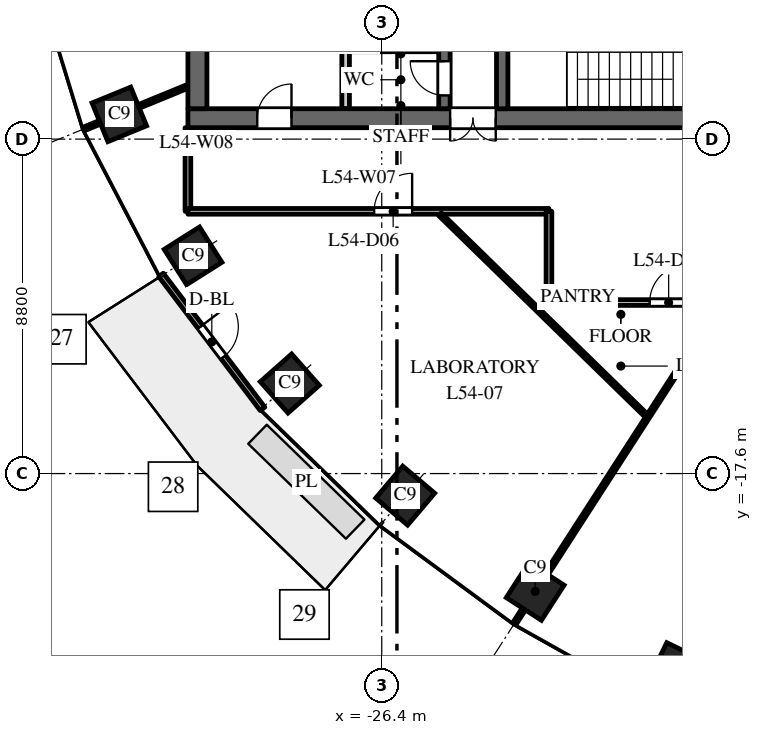
"""IFC4 building model, lengths in metres.
Left out: names, types, materials, properties, quantities, classifications, styles, units other than length and angle.
Written with IfcOpenShell. Run it as: python <this file> out.ifc"""

import sys

from ifc_helpers import new_model, si_unit, direction, frame, frame_2d, origin, origin_2d, place, context, subcontext, project, spatial, rectangle, extrude, element, fill, save


model = new_model("IFC4")
c1 = context("Model", 3, precision=1e-05, world=origin(), true_north=direction((0.0, 1.0)))
c2 = subcontext(c1, "Body", "Model", "MODEL_VIEW")
j1 = project(units=[si_unit("LENGTHUNIT", "METRE"), si_unit("PLANEANGLEUNIT", "RADIAN")], contexts=[c1])
p1 = place(None, origin())
s1 = spatial("IfcSite", under=j1, at=p1, CompositionType="ELEMENT")
p2 = place(p1, origin())
s2 = spatial("IfcBuilding", under=s1, at=p2, CompositionType="ELEMENT")
p3 = place(p2, frame((0.0, 0.0, 257.5)))
s3 = spatial("IfcBuildingStorey", under=s2, at=p3, CompositionType="ELEMENT", Elevation=257.5)
for number, where, z_axis, x_axis in (
    (1, (-33.305, -8.149, 0.0), (0.0, 0.0, 1.0), (0.379, -0.925, 0.0)),
    (2, (-31.365, -11.871, 0.0), (0.0, 0.0, 1.0), (0.535, -0.845, 0.0)),
    (3, (-28.819, -15.23, 0.0), (0.0, 0.0, 1.0), (0.663, -0.749, 0.0)),
    (4, (-25.783, -18.18, 0.0), (0.0, 0.0, 1.0), (0.763, -0.646, 0.0)),
    (5, (-22.362, -20.7, 0.0), (0.0, 0.0, 1.0), (0.84, -0.542, 0.0)),
    (6, (-18.646, -22.785, 0.0), (0.0, 0.0, 1.0), (0.898, -0.439, 0.0)),
):
    element("IfcColumn", number, at=place(p3, frame(where, z_axis=z_axis, x_axis=x_axis)), inside=s3, PredefinedType="COLUMN", context=c2, shape_type="SweptSolid", body=[
        extrude(rectangle(XDim=1.1, YDim=1.1, at=origin_2d()), origin(), (0.0, 0.0, 1.0), 4.0),
    ])
p4 = place(p3, frame((-16.5, -8.25, 0.0), z_axis=(0.0, 0.0, 1.0), x_axis=(-1.0, 0.0, 0.0)))
e7 = element("IfcWall", 7, at=p4, inside=s3, PredefinedType="SHEAR", context=c2, shape_type="SweptSolid", body=[
    extrude(rectangle(XDim=15.0, YDim=0.5, at=frame_2d((7.5, 0.0))), origin(), (0.0, 0.0, 1.0), 3.7),
])
p5 = place(p4, frame((6.9, 0.0, 0.0)))
e8 = element("IfcOpeningElement", 8, at=p5, cuts=e7, PredefinedType="OPENING", context=c2, shape_type="SweptSolid", body=[
    extrude(rectangle(XDim=1.2, YDim=2.1, at=frame_2d((0.6, 1.05))), frame((0.0, 0.26, 0.0), z_axis=(0.0, -1.0, 0.0), x_axis=(1.0, 0.0, 0.0)), (0.0, 0.0, 1.0), 0.52),
])
p6 = place(p4, frame((12.275, 0.0, 0.0)))
e9 = element("IfcOpeningElement", 9, at=p6, cuts=e7, PredefinedType="OPENING", context=c2, shape_type="SweptSolid", body=[
    extrude(rectangle(XDim=0.9, YDim=2.1, at=frame_2d((0.45, 1.05))), frame((0.0, 0.26, 0.0), z_axis=(0.0, -1.0, 0.0), x_axis=(1.0, 0.0, 0.0)), (0.0, 0.0, 1.0), 0.52),
])
p7 = place(p3, frame((-24.75, -8.0, 0.0), z_axis=(0.0, 0.0, 1.0), x_axis=(0.0, 1.0, 0.0)))
e10 = element("IfcWall", 10, at=p7, inside=s3, PredefinedType="SHEAR", context=c2, shape_type="SweptSolid", body=[
    extrude(rectangle(XDim=16.0, YDim=0.3, at=frame_2d((8.0, 0.0))), origin(), (0.0, 0.0, 1.0), 3.7),
])
p8 = place(p7, frame((4.425, 0.0, 0.0)))
e11 = element("IfcOpeningElement", 11, at=p8, cuts=e10, PredefinedType="OPENING", context=c2, shape_type="SweptSolid", body=[
    extrude(rectangle(XDim=1.1, YDim=2.1, at=frame_2d((0.55, 1.05))), frame((0.0, 0.16, 0.0), z_axis=(0.0, -1.0, 0.0), x_axis=(1.0, 0.0, 0.0)), (0.0, 0.0, 1.0), 0.32),
])
p9 = place(p7, frame((7.45, 0.0, 0.0)))
e12 = element("IfcOpeningElement", 12, at=p9, cuts=e10, PredefinedType="OPENING", context=c2, shape_type="SweptSolid", body=[
    extrude(rectangle(XDim=1.1, YDim=2.1, at=frame_2d((0.55, 1.05))), frame((0.0, 0.16, 0.0), z_axis=(0.0, -1.0, 0.0), x_axis=(1.0, 0.0, 0.0)), (0.0, 0.0, 1.0), 0.32),
])
p10 = place(p7, frame((10.475, 0.0, 0.0)))
e13 = element("IfcOpeningElement", 13, at=p10, cuts=e10, PredefinedType="OPENING", context=c2, shape_type="SweptSolid", body=[
    extrude(rectangle(XDim=1.1, YDim=2.1, at=frame_2d((0.55, 1.05))), frame((0.0, 0.16, 0.0), z_axis=(0.0, -1.0, 0.0), x_axis=(1.0, 0.0, 0.0)), (0.0, 0.0, 1.0), 0.32),
])
p11 = place(p7, frame((13.75, 0.0, 0.0)))
e14 = element("IfcOpeningElement", 14, at=p11, cuts=e10, PredefinedType="OPENING", context=c2, shape_type="SweptSolid", body=[
    extrude(rectangle(XDim=0.9, YDim=2.1, at=frame_2d((0.45, 1.05))), frame((0.0, 0.16, 0.0), z_axis=(0.0, -1.0, 0.0), x_axis=(1.0, 0.0, 0.0)), (0.0, 0.0, 1.0), 0.32),
])
p12 = place(p7, frame((1.975, 0.0, 0.0)))
e15 = element("IfcOpeningElement", 15, at=p12, cuts=e10, PredefinedType="OPENING", context=c2, shape_type="SweptSolid", body=[
    extrude(rectangle(XDim=0.9, YDim=2.1, at=frame_2d((0.45, 1.05))), frame((0.0, 0.16, 0.0), z_axis=(0.0, -1.0, 0.0), x_axis=(1.0, 0.0, 0.0)), (0.0, 0.0, 1.0), 0.32),
])
p13 = place(p7, frame((0.35, 0.0, 0.0)))
e16 = element("IfcOpeningElement", 16, at=p13, cuts=e10, PredefinedType="OPENING", context=c2, shape_type="SweptSolid", body=[
    extrude(rectangle(XDim=0.9, YDim=2.1, at=frame_2d((0.45, 1.05))), frame((0.0, 0.16, 0.0), z_axis=(0.0, -1.0, 0.0), x_axis=(1.0, 0.0, 0.0)), (0.0, 0.0, 1.0), 0.32),
])
p14 = place(p3, frame((-31.25, -8.0, 0.0), z_axis=(0.0, 0.0, 1.0), x_axis=(0.0, 1.0, 0.0)))
e17 = element("IfcWall", 17, at=p14, inside=s3, PredefinedType="SHEAR", context=c2, shape_type="SweptSolid", body=[
    extrude(rectangle(XDim=16.0, YDim=0.5, at=frame_2d((8.0, 0.0))), origin(), (0.0, 0.0, 1.0), 3.7),
])
p15 = place(p3, frame((-27.35, -8.0, 0.0), z_axis=(0.0, 0.0, 1.0), x_axis=(0.0, 1.0, 0.0)))
e18 = element("IfcWall", 18, at=p15, inside=s3, PredefinedType="PARTITIONING", context=c2, shape_type="SweptSolid", body=[
    extrude(rectangle(XDim=3.25, YDim=0.2, at=frame_2d((1.625, 0.0))), origin(), (0.0, 0.0, 1.0), 3.7),
])
p16 = place(p3, frame((-23.23, -8.0, 0.0), z_axis=(0.0, 0.0, 1.0), x_axis=(0.0, 1.0, 0.0)))
e19 = element("IfcWall", 19, at=p16, inside=s3, PredefinedType="SHEAR", context=c2, shape_type="SweptSolid", body=[
    extrude(rectangle(XDim=7.875, YDim=0.3, at=frame_2d((3.938, 0.0))), origin(), (0.0, 0.0, 1.0), 3.7),
])
p17 = place(p16, frame((5.15, 0.0, 0.0)))
e20 = element("IfcOpeningElement", 20, at=p17, cuts=e19, PredefinedType="OPENING", context=c2, shape_type="SweptSolid", body=[
    extrude(rectangle(XDim=1.1, YDim=2.1, at=frame_2d((0.55, 1.05))), frame((0.0, 0.16, 0.0), z_axis=(0.0, -1.0, 0.0), x_axis=(1.0, 0.0, 0.0)), (0.0, 0.0, 1.0), 0.32),
])
p18 = place(p3, frame((-32.208, -12.374, 0.0), z_axis=(0.0, 0.0, 1.0), x_axis=(0.604045763106, -0.796949632081, 0.0)))
e21 = element("IfcWall", 21, at=p18, inside=s3, PredefinedType="STANDARD", context=c2, shape_type="SweptSolid", body=[
    extrude(rectangle(XDim=4.423, YDim=0.15, at=frame_2d((2.212, 0.0))), origin(), (0.0, 0.0, 1.0), 3.7),
])
p19 = place(p18, frame((1.712, 0.0, 0.0)))
e22 = element("IfcOpeningElement", 22, at=p19, cuts=e21, PredefinedType="OPENING", context=c2, shape_type="SweptSolid", body=[
    extrude(rectangle(XDim=1.0, YDim=2.4, at=frame_2d((0.5, 1.2))), frame((0.0, 0.085, 0.0), z_axis=(0.0, -1.0, 0.0), x_axis=(1.0, 0.0, 0.0)), (0.0, 0.0, 1.0), 0.17),
])
p20 = place(p3, frame((-34.234, -8.53, 0.0), z_axis=(0.0, 0.0, 1.0), x_axis=(0.925344112436, 0.379128307542, 0.0)))
e23 = element("IfcWall", 23, at=p20, inside=s3, PredefinedType="PARTITIONING", context=c2, shape_type="SweptSolid", body=[
    extrude(rectangle(XDim=2.954, YDim=0.1, at=frame_2d((1.477, 0.0))), origin(), (0.0, 0.0, 1.0), 3.0),
])
p21 = place(p3, frame((-31.5, -10.7, 0.0), z_axis=(0.0, 0.0, 1.0), x_axis=(0.0, 1.0, 0.0)))
e24 = element("IfcWall", 24, at=p21, inside=s3, PredefinedType="PARTITIONING", context=c2, shape_type="SweptSolid", body=[
    extrude(rectangle(XDim=2.2, YDim=0.15, at=frame_2d((1.1, 0.0))), origin(), (0.0, 0.0, 1.0), 3.7),
])
p22 = place(p3, frame((-31.5, -10.7, 0.0), z_axis=(0.0, 0.0, 1.0), x_axis=(1.0, 0.0, 0.0)))
e25 = element("IfcWall", 25, at=p22, inside=s3, PredefinedType="PARTITIONING", context=c2, shape_type="SweptSolid", body=[
    extrude(rectangle(XDim=9.5, YDim=0.15, at=frame_2d((4.75, 0.0))), origin(), (0.0, 0.0, 1.0), 3.1),
])
p23 = place(p22, frame((4.9, 0.0, 0.0)))
e26 = element("IfcOpeningElement", 26, at=p23, cuts=e25, PredefinedType="OPENING", context=c2, shape_type="SweptSolid", body=[
    extrude(rectangle(XDim=1.0, YDim=2.1, at=frame_2d((0.5, 1.05))), frame((0.0, 0.085, 0.0), z_axis=(0.0, -1.0, 0.0), x_axis=(1.0, 0.0, 0.0)), (0.0, 0.0, 1.0), 0.17),
])
p24 = place(p3, frame((-24.866, -10.778, 0.0), z_axis=(0.0, 0.0, 1.0), x_axis=(0.715632814242, -0.698476681916, 0.0)))
e27 = element("IfcWall", 27, at=p24, inside=s3, PredefinedType="PARTITIONING", context=c2, shape_type="SweptSolid", body=[
    extrude(rectangle(XDim=7.585, YDim=0.1, at=frame_2d((3.792, 0.0))), origin(), (0.0, 0.0, 1.0), 2.75),
])
p25 = place(p3, frame((-22.905, -21.542, 0.0), z_axis=(0.0, 0.0, 1.0), x_axis=(0.542277075573, 0.840199722273, 0.0)))
e28 = element("IfcWall", 28, at=p25, inside=s3, PredefinedType="PARTITIONING", context=c2, shape_type="SweptSolid", body=[
    extrude(rectangle(XDim=9.958, YDim=0.1, at=frame_2d((4.979, 0.0))), origin(), (0.0, 0.0, 1.0), 3.0),
])
p26 = place(p3, frame((-22.0, -13.1, 0.0), z_axis=(0.0, 0.0, 1.0), x_axis=(0.0, 1.0, 0.0)))
e29 = element("IfcWall", 29, at=p26, inside=s3, PredefinedType="PARTITIONING", context=c2, shape_type="SweptSolid", body=[
    extrude(rectangle(XDim=2.4, YDim=0.15, at=frame_2d((1.2, 0.0))), origin(), (0.0, 0.0, 1.0), 3.7),
])
p27 = place(p3, frame((-22.0, -13.1, 0.0), z_axis=(0.0, 0.0, 1.0), x_axis=(1.0, 0.0, 0.0)))
e30 = element("IfcWall", 30, at=p27, inside=s3, PredefinedType="PARTITIONING", context=c2, shape_type="SweptSolid", body=[
    extrude(rectangle(XDim=17.507, YDim=0.15, at=frame_2d((8.753, 0.0))), origin(), (0.0, 0.0, 1.0), 2.75),
])
p28 = place(p27, frame((2.65, 0.0, 0.0)))
e31 = element("IfcOpeningElement", 31, at=p28, cuts=e30, PredefinedType="OPENING", context=c2, shape_type="SweptSolid", body=[
    extrude(rectangle(XDim=1.0, YDim=2.1, at=frame_2d((0.5, 1.05))), frame((0.0, 0.085, 0.0), z_axis=(0.0, -1.0, 0.0), x_axis=(1.0, 0.0, 0.0)), (0.0, 0.0, 1.0), 0.17),
])
p29 = place(p27, frame((15.936, 0.0, 0.0)))
e32 = element("IfcOpeningElement", 32, at=p29, cuts=e30, PredefinedType="OPENING", context=c2, shape_type="SweptSolid", body=[
    extrude(rectangle(XDim=1.0, YDim=2.1, at=frame_2d((0.5, 1.05))), frame((0.0, 0.085, 0.0), z_axis=(0.0, -1.0, 0.0), x_axis=(1.0, 0.0, 0.0)), (0.0, 0.0, 1.0), 0.17),
])
p30 = place(p5, origin())
e33 = element("IfcDoor", 33, at=p30, inside=s3, OperationType="DOUBLE_DOOR_DOUBLE_SWING", PredefinedType="DOOR", context=c2, shape_type="SweptSolid", body=[
    extrude(rectangle(XDim=1.2, YDim=2.1, at=frame_2d((0.6, 1.05))), frame((0.0, 0.025, 0.0), z_axis=(0.0, -1.0, 0.0), x_axis=(1.0, 0.0, 0.0)), (0.0, 0.0, 1.0), 0.05),
])
fill(e8, e33)
p31 = place(p13, origin())
e34 = element("IfcDoor", 34, at=p31, inside=s3, OperationType="SINGLE_SWING_LEFT", PredefinedType="DOOR", context=c2, shape_type="SweptSolid", body=[
    extrude(rectangle(XDim=0.9, YDim=2.1, at=frame_2d((0.45, 1.05))), frame((0.0, 0.025, 0.0), z_axis=(0.0, -1.0, 0.0), x_axis=(1.0, 0.0, 0.0)), (0.0, 0.0, 1.0), 0.05),
])
fill(e16, e34)
p32 = place(p6, origin())
e35 = element("IfcDoor", 35, at=p32, inside=s3, OperationType="SINGLE_SWING_LEFT", PredefinedType="DOOR", context=c2, shape_type="SweptSolid", body=[
    extrude(rectangle(XDim=0.9, YDim=2.1, at=frame_2d((0.45, 1.05))), frame((0.0, 0.025, 0.0), z_axis=(0.0, -1.0, 0.0), x_axis=(1.0, 0.0, 0.0)), (0.0, 0.0, 1.0), 0.05),
])
fill(e9, e35)
p33 = place(p19, origin())
e36 = element("IfcDoor", 36, at=p33, inside=s3, OperationType="SINGLE_SWING_LEFT", PredefinedType="DOOR", context=c2, shape_type="SweptSolid", body=[
    extrude(rectangle(XDim=1.0, YDim=2.4, at=frame_2d((0.5, 1.2))), frame((0.0, 0.025, 0.0), z_axis=(0.0, -1.0, 0.0), x_axis=(1.0, 0.0, 0.0)), (0.0, 0.0, 1.0), 0.05),
])
fill(e22, e36)
p34 = place(p23, origin())
e37 = element("IfcDoor", 37, at=p34, inside=s3, OperationType="SINGLE_SWING_RIGHT", PredefinedType="DOOR", context=c2, shape_type="SweptSolid", body=[
    extrude(rectangle(XDim=1.0, YDim=2.1, at=frame_2d((0.5, 1.05))), frame((0.0, 0.025, 0.0), z_axis=(0.0, -1.0, 0.0), x_axis=(1.0, 0.0, 0.0)), (0.0, 0.0, 1.0), 0.05),
])
fill(e26, e37)
p35 = place(p28, origin())
e38 = element("IfcDoor", 38, at=p35, inside=s3, OperationType="SINGLE_SWING_RIGHT", PredefinedType="DOOR", context=c2, shape_type="SweptSolid", body=[
    extrude(rectangle(XDim=1.0, YDim=2.1, at=frame_2d((0.5, 1.05))), frame((0.0, 0.025, 0.0), z_axis=(0.0, -1.0, 0.0), x_axis=(1.0, 0.0, 0.0)), (0.0, 0.0, 1.0), 0.05),
])
fill(e31, e38)
save(model, sys.argv[1])
